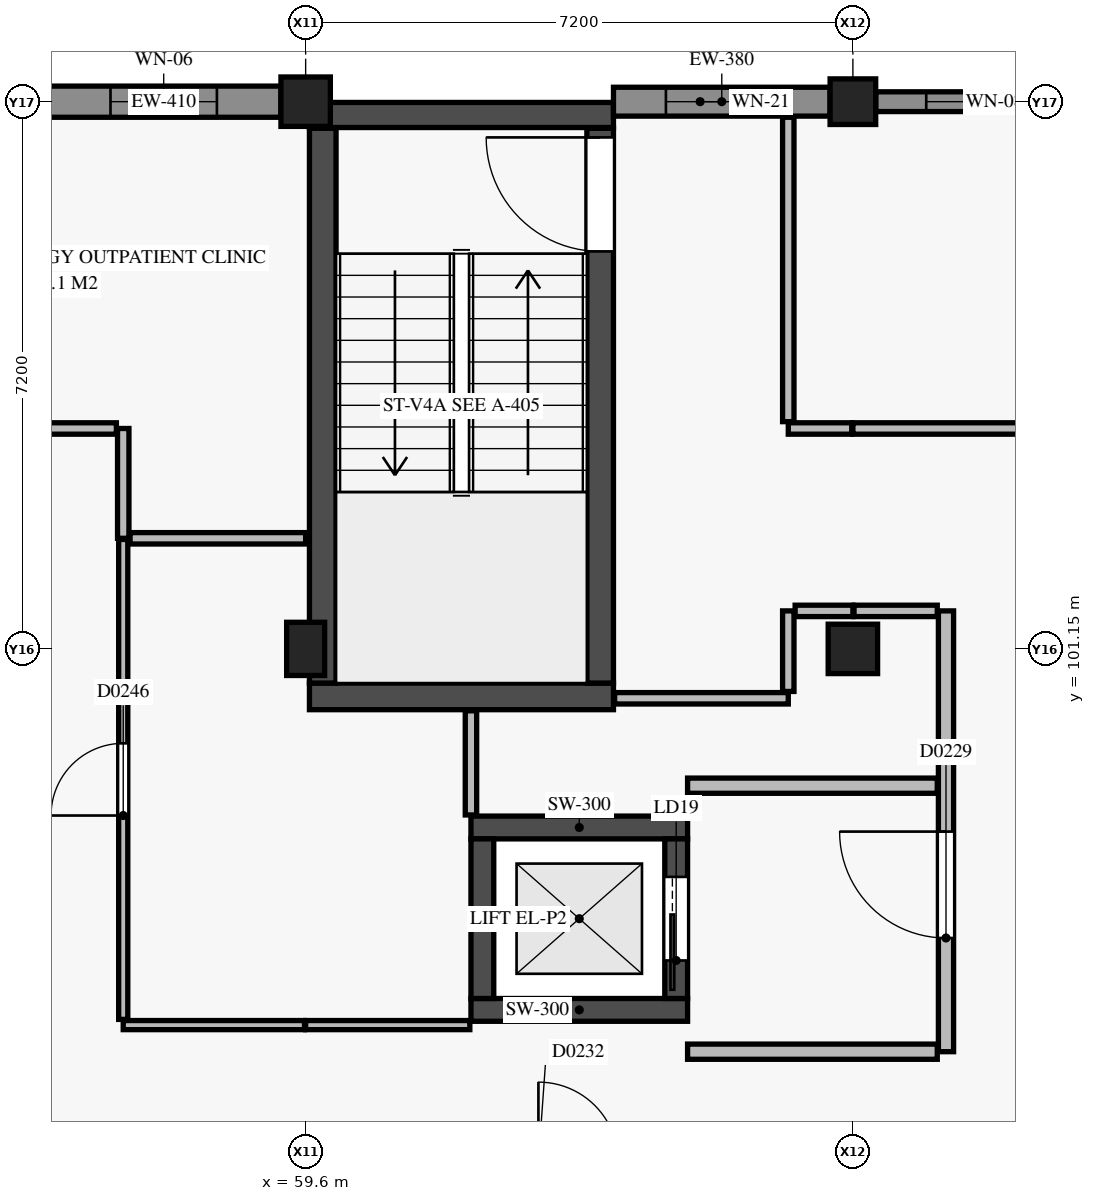
"""IFC4 building model, lengths in metres.
Left out: names, types, materials, properties, quantities, classifications, styles, units other than length and angle.
Written with IfcOpenShell. Run it as: python <this file> out.ifc"""

import sys

from ifc_helpers import new_model, si_unit, direction, frame, frame_2d, origin, origin_2d, place, context, subcontext, project, spatial, rectangle, circle, extrude, element, fill, save


model = new_model("IFC4")
c1 = context("Model", 3, precision=1e-05, world=origin(), true_north=direction((0.0, 1.0)))
c2 = subcontext(c1, "Body", "Model", "MODEL_VIEW")
j1 = project(units=[si_unit("LENGTHUNIT", "METRE"), si_unit("PLANEANGLEUNIT", "RADIAN")], contexts=[c1])
p1 = place(None, origin())
s1 = spatial("IfcSite", under=j1, at=p1, CompositionType="ELEMENT")
p2 = place(p1, origin())
s2 = spatial("IfcBuilding", under=s1, at=p2, CompositionType="ELEMENT")
p3 = place(p2, frame((0.0, 0.0, 9.0)))
s3 = spatial("IfcBuildingStorey", under=s2, at=p3, CompositionType="ELEMENT", Elevation=9.0)
p4 = place(p3, frame((59.6, 101.15, 0.0), z_axis=(0.0, 0.0, 1.0), x_axis=(1.0, 0.0, 0.0)))
e1 = element("IfcColumn", 1, at=p4, inside=s3, PredefinedType="COLUMN", context=c2, shape_type="SweptSolid", body=[
    extrude(rectangle(XDim=0.5, YDim=0.7, at=origin_2d()), origin(), (0.0, 0.0, 1.0), 4.2),
])
p5 = place(p3, frame((59.6, 108.35, 0.0), z_axis=(0.0, 0.0, 1.0), x_axis=(1.0, 0.0, 0.0)))
e2 = element("IfcColumn", 2, at=p5, inside=s3, PredefinedType="COLUMN", context=c2, shape_type="SweptSolid", body=[
    extrude(circle(Radius=0.325, at=origin_2d()), origin(), (0.0, 0.0, 1.0), 4.2),
])
p6 = place(p3, frame((66.8, 101.15, 0.0), z_axis=(0.0, 0.0, 1.0), x_axis=(1.0, 0.0, 0.0)))
e3 = element("IfcColumn", 3, at=p6, inside=s3, PredefinedType="COLUMN", context=c2, shape_type="SweptSolid", body=[
    extrude(rectangle(XDim=0.65, YDim=0.65, at=origin_2d()), origin(), (0.0, 0.0, 1.0), 4.2),
])
p7 = place(p3, frame((66.8, 108.35, 0.0), z_axis=(0.0, 0.0, 1.0), x_axis=(1.0, 0.0, 0.0)))
e4 = element("IfcColumn", 4, at=p7, inside=s3, PredefinedType="COLUMN", context=c2, shape_type="SweptSolid", body=[
    extrude(rectangle(XDim=0.6, YDim=0.6, at=origin_2d()), origin(), (0.0, 0.0, 1.0), 4.2),
])
p8 = place(p3, frame((59.65, 100.525, 0.0), z_axis=(0.0, 0.0, 1.0), x_axis=(1.0, 0.0, 0.0)))
e5 = element("IfcWall", 5, at=p8, inside=s3, PredefinedType="SHEAR", context=c2, shape_type="SweptSolid", body=[
    extrude(rectangle(XDim=4.0, YDim=0.35, at=frame_2d((2.0, 0.0))), origin(), (0.0, 0.0, 1.0), 3.95),
])
p9 = place(p3, frame((59.65, 108.175, 0.0), z_axis=(0.0, 0.0, 1.0), x_axis=(1.0, 0.0, 0.0)))
e6 = element("IfcWall", 6, at=p9, inside=s3, PredefinedType="SHEAR", context=c2, shape_type="SweptSolid", body=[
    extrude(rectangle(XDim=4.0, YDim=0.33, at=frame_2d((2.0, 0.0))), origin(), (0.0, 0.0, 1.0), 3.95),
])
p10 = place(p3, frame((59.825, 100.7, 0.0), z_axis=(0.0, 0.0, 1.0), x_axis=(0.0, 1.0, 0.0)))
e7 = element("IfcWall", 7, at=p10, inside=s3, PredefinedType="SHEAR", context=c2, shape_type="SweptSolid", body=[
    extrude(rectangle(XDim=7.3, YDim=0.35, at=frame_2d((3.65, 0.0))), origin(), (0.0, 0.0, 1.0), 3.95),
])
p11 = place(p3, frame((63.475, 100.7, 0.0), z_axis=(0.0, 0.0, 1.0), x_axis=(0.0, 1.0, 0.0)))
e8 = element("IfcWall", 8, at=p11, inside=s3, PredefinedType="SHEAR", context=c2, shape_type="SweptSolid", body=[
    extrude(rectangle(XDim=7.3, YDim=0.35, at=frame_2d((3.65, 0.0))), origin(), (0.0, 0.0, 1.0), 3.95),
])
p12 = place(p11, frame((5.68, 0.0, 0.0)))
e9 = element("IfcOpeningElement", 9, at=p12, cuts=e8, PredefinedType="OPENING", context=c2, shape_type="SweptSolid", body=[
    extrude(rectangle(XDim=1.5, YDim=2.15, at=frame_2d((0.75, 1.075))), frame((0.0, 0.185, 0.0), z_axis=(0.0, -1.0, 0.0), x_axis=(1.0, 0.0, 0.0)), (0.0, 0.0, 1.0), 0.37),
])
for number, where, z_axis, x_axis in (
    (10, (61.775, 96.4, 0.0), (0.0, 0.0, 1.0), (1.0, 0.0, 0.0)),
    (11, (61.775, 98.8, 0.0), (0.0, 0.0, 1.0), (1.0, 0.0, 0.0)),
):
    element("IfcWall", number, at=place(p3, frame(where, z_axis=z_axis, x_axis=x_axis)), inside=s3, PredefinedType="SHEAR", context=c2, shape_type="SweptSolid", body=[
        extrude(rectangle(XDim=2.85, YDim=0.3, at=frame_2d((1.425, 0.0))), origin(), (0.0, 0.0, 1.0), 3.95),
    ])
p13 = place(p3, frame((61.925, 96.55, 0.0), z_axis=(0.0, 0.0, 1.0), x_axis=(0.0, 1.0, 0.0)))
e12 = element("IfcWall", 12, at=p13, inside=s3, PredefinedType="SHEAR", context=c2, shape_type="SweptSolid", body=[
    extrude(rectangle(XDim=2.1, YDim=0.3, at=frame_2d((1.05, 0.0))), origin(), (0.0, 0.0, 1.0), 3.95),
])
p14 = place(p3, frame((64.475, 96.55, 0.0), z_axis=(0.0, 0.0, 1.0), x_axis=(0.0, 1.0, 0.0)))
e13 = element("IfcWall", 13, at=p14, inside=s3, PredefinedType="SHEAR", context=c2, shape_type="SweptSolid", body=[
    extrude(rectangle(XDim=2.1, YDim=0.3, at=frame_2d((1.05, 0.0))), origin(), (0.0, 0.0, 1.0), 3.95),
])
p15 = place(p14, frame((0.5, 0.0, 0.0)))
e14 = element("IfcOpeningElement", 14, at=p15, cuts=e13, PredefinedType="OPENING", context=c2, shape_type="SweptSolid", body=[
    extrude(rectangle(XDim=1.1, YDim=2.15, at=frame_2d((0.55, 1.075))), frame((0.0, 0.16, 0.0), z_axis=(0.0, -1.0, 0.0), x_axis=(1.0, 0.0, 0.0)), (0.0, 0.0, 1.0), 0.32),
])
p16 = place(p3, frame((56.19, 108.35, 0.0), z_axis=(0.0, 0.0, 1.0), x_axis=(1.0, 0.0, 0.0)))
e15 = element("IfcWall", 15, at=p16, inside=s3, PredefinedType="USERDEFINED", context=c2, shape_type="SweptSolid", body=[
    extrude(rectangle(XDim=3.085, YDim=0.41, at=frame_2d((1.542, 0.0))), origin(), (0.0, 0.0, 1.0), 3.13),
])
p17 = place(p16, frame((0.843, 0.0, 0.9)))
e16 = element("IfcOpeningElement", 16, at=p17, cuts=e15, PredefinedType="OPENING", context=c2, shape_type="SweptSolid", body=[
    extrude(rectangle(XDim=1.4, YDim=1.8, at=frame_2d((0.7, 0.9))), frame((0.0, 0.215, 0.0), z_axis=(0.0, -1.0, 0.0), x_axis=(1.0, 0.0, 0.0)), (0.0, 0.0, 1.0), 0.43),
])
p18 = place(p3, frame((63.65, 108.35, 0.0), z_axis=(0.0, 0.0, 1.0), x_axis=(1.0, 0.0, 0.0)))
e17 = element("IfcWall", 17, at=p18, inside=s3, PredefinedType="USERDEFINED", context=c2, shape_type="SweptSolid", body=[
    extrude(rectangle(XDim=2.85, YDim=0.38, at=frame_2d((1.425, 0.0))), origin(), (0.0, 0.0, 1.0), 3.13),
])
p19 = place(p18, frame((0.69, 0.0, 0.95)))
e18 = element("IfcOpeningElement", 18, at=p19, cuts=e17, PredefinedType="OPENING", context=c2, shape_type="SweptSolid", body=[
    extrude(rectangle(XDim=0.9, YDim=1.2, at=frame_2d((0.45, 0.6))), frame((0.0, 0.2, 0.0), z_axis=(0.0, -1.0, 0.0), x_axis=(1.0, 0.0, 0.0)), (0.0, 0.0, 1.0), 0.4),
])
p20 = place(p3, frame((67.1, 108.35, 0.0), z_axis=(0.0, 0.0, 1.0), x_axis=(1.0, 0.0, 0.0)))
e19 = element("IfcWall", 19, at=p20, inside=s3, PredefinedType="SOLIDWALL", context=c2, shape_type="SweptSolid", body=[
    extrude(rectangle(XDim=3.13, YDim=0.26, at=frame_2d((1.565, 0.0))), origin(), (0.0, 0.0, 1.0), 3.13),
])
p21 = place(p20, frame((0.665, 0.0, 0.9)))
e20 = element("IfcOpeningElement", 20, at=p21, cuts=e19, PredefinedType="OPENING", context=c2, shape_type="SweptSolid", body=[
    extrude(rectangle(XDim=1.8, YDim=1.8, at=frame_2d((0.9, 0.9))), frame((0.0, 0.14, 0.0), z_axis=(0.0, -1.0, 0.0), x_axis=(1.0, 0.0, 0.0)), (0.0, 0.0, 1.0), 0.28),
])
p22 = place(p3, frame((68.025, 95.85, 0.0), z_axis=(0.0, 0.0, 1.0), x_axis=(0.0, 1.0, 0.0)))
e21 = element("IfcWall", 21, at=p22, inside=s3, PredefinedType="PARTITIONING", context=c2, shape_type="SweptSolid", body=[
    extrude(rectangle(XDim=5.8, YDim=0.2, at=frame_2d((2.9, 0.0))), origin(), (0.0, 0.0, 1.0), 3.285),
])
p23 = place(p22, frame((1.496, 0.0, 0.0)))
e22 = element("IfcOpeningElement", 22, at=p23, cuts=e21, PredefinedType="OPENING", context=c2, shape_type="SweptSolid", body=[
    extrude(rectangle(XDim=1.4, YDim=2.2, at=frame_2d((0.7, 1.1))), frame((0.0, 0.11, 0.0), z_axis=(0.0, -1.0, 0.0), x_axis=(1.0, 0.0, 0.0)), (0.0, 0.0, 1.0), 0.22),
])
for number, where, z_axis, x_axis in (
    (23, (64.625, 95.85, 0.0), (0.0, 0.0, 1.0), (1.0, 0.0, 0.0)),
    (24, (64.625, 99.35, 0.0), (0.0, 0.0, 1.0), (1.0, 0.0, 0.0)),
):
    element("IfcWall", number, at=place(p3, frame(where, z_axis=z_axis, x_axis=x_axis)), inside=s3, PredefinedType="PARTITIONING", context=c2, shape_type="SweptSolid", body=[
        extrude(rectangle(XDim=3.285, YDim=0.2, at=frame_2d((1.643, 0.0))), origin(), (0.0, 0.0, 1.0), 3.285),
    ])
p24 = place(p3, frame((57.2, 102.605, 0.0), z_axis=(0.0, 0.0, 1.0), x_axis=(0.0, 1.0, 0.0)))
e25 = element("IfcWall", 25, at=p24, inside=s3, PredefinedType="PARTITIONING", context=c2, shape_type="SweptSolid", body=[
    extrude(rectangle(XDim=1.445, YDim=0.15, at=frame_2d((0.723, 0.0))), origin(), (0.0, 0.0, 1.0), 3.515),
])
p25 = place(p3, frame((55.85, 104.05, 0.0), z_axis=(0.0, 0.0, 1.0), x_axis=(1.0, 0.0, 0.0)))
e26 = element("IfcWall", 26, at=p25, inside=s3, PredefinedType="PARTITIONING", context=c2, shape_type="SweptSolid", body=[
    extrude(rectangle(XDim=1.26, YDim=0.15, at=frame_2d((0.63, 0.0))), origin(), (0.0, 0.0, 1.0), 3.95),
])
p26 = place(p3, frame((66.8, 104.05, 0.0), z_axis=(0.0, 0.0, 1.0), x_axis=(1.0, 0.0, 0.0)))
e27 = element("IfcWall", 27, at=p26, inside=s3, PredefinedType="PARTITIONING", context=c2, shape_type="SweptSolid", body=[
    extrude(rectangle(XDim=7.2, YDim=0.15, at=frame_2d((3.6, 0.0))), origin(), (0.0, 0.0, 1.0), 3.135),
])
p27 = place(p26, frame((3.1, 0.0, 0.0)))
e28 = element("IfcOpeningElement", 28, at=p27, cuts=e27, PredefinedType="OPENING", context=c2, shape_type="SweptSolid", body=[
    extrude(rectangle(XDim=1.0, YDim=2.15, at=frame_2d((0.5, 1.075))), frame((0.0, 0.085, 0.0), z_axis=(0.0, -1.0, 0.0), x_axis=(1.0, 0.0, 0.0)), (0.0, 0.0, 1.0), 0.17),
])
p28 = place(p3, frame((65.95, 104.05, 0.0), z_axis=(0.0, 0.0, 1.0), x_axis=(1.0, 0.0, 0.0)))
e29 = element("IfcWall", 29, at=p28, inside=s3, PredefinedType="PARTITIONING", context=c2, shape_type="SweptSolid", body=[
    extrude(rectangle(XDim=0.835, YDim=0.15, at=frame_2d((0.417, 0.0))), origin(), (0.0, 0.0, 1.0), 3.285),
])
p29 = place(p3, frame((65.95, 104.14, 0.0), z_axis=(0.0, 0.0, 1.0), x_axis=(0.0, 1.0, 0.0)))
e30 = element("IfcWall", 30, at=p29, inside=s3, PredefinedType="PARTITIONING", context=c2, shape_type="SweptSolid", body=[
    extrude(rectangle(XDim=4.005, YDim=0.15, at=frame_2d((2.002, 0.0))), origin(), (0.0, 0.0, 1.0), 3.95),
])
p30 = place(p3, frame((63.665, 100.5, 0.0), z_axis=(0.0, 0.0, 1.0), x_axis=(1.0, 0.0, 0.0)))
e31 = element("IfcWall", 31, at=p30, inside=s3, PredefinedType="PARTITIONING", context=c2, shape_type="SweptSolid", body=[
    extrude(rectangle(XDim=2.285, YDim=0.15, at=frame_2d((1.143, 0.0))), origin(), (0.0, 0.0, 1.0), 3.95),
])
p31 = place(p3, frame((65.95, 100.59, 0.0), z_axis=(0.0, 0.0, 1.0), x_axis=(0.0, 1.0, 0.0)))
e32 = element("IfcWall", 32, at=p31, inside=s3, PredefinedType="PARTITIONING", context=c2, shape_type="SweptSolid", body=[
    extrude(rectangle(XDim=1.06, YDim=0.15, at=frame_2d((0.53, 0.0))), origin(), (0.0, 0.0, 1.0), 3.95),
])
p32 = place(p3, frame((66.04, 101.65, 0.0), z_axis=(0.0, 0.0, 1.0), x_axis=(1.0, 0.0, 0.0)))
e33 = element("IfcWall", 33, at=p32, inside=s3, PredefinedType="PARTITIONING", context=c2, shape_type="SweptSolid", body=[
    extrude(rectangle(XDim=0.76, YDim=0.15, at=frame_2d((0.38, 0.0))), origin(), (0.0, 0.0, 1.0), 3.285),
])
p33 = place(p3, frame((66.815, 101.65, 0.0), z_axis=(0.0, 0.0, 1.0), x_axis=(1.0, 0.0, 0.0)))
e34 = element("IfcWall", 34, at=p33, inside=s3, PredefinedType="PARTITIONING", context=c2, shape_type="SweptSolid", body=[
    extrude(rectangle(XDim=1.095, YDim=0.15, at=frame_2d((0.547, 0.0))), origin(), (0.0, 0.0, 1.0), 3.285),
])
p34 = place(p3, frame((59.6, 96.2, 0.0), z_axis=(0.0, 0.0, 1.0), x_axis=(1.0, 0.0, 0.0)))
e35 = element("IfcWall", 35, at=p34, inside=s3, PredefinedType="PARTITIONING", context=c2, shape_type="SweptSolid", body=[
    extrude(rectangle(XDim=2.16, YDim=0.12, at=frame_2d((1.08, 0.0))), origin(), (0.0, 0.0, 1.0), 3.455),
])
p35 = place(p3, frame((57.2, 96.2, 0.0), z_axis=(0.0, 0.0, 1.0), x_axis=(1.0, 0.0, 0.0)))
e36 = element("IfcWall", 36, at=p35, inside=s3, PredefinedType="PARTITIONING", context=c2, shape_type="SweptSolid", body=[
    extrude(rectangle(XDim=2.385, YDim=0.12, at=frame_2d((1.192, 0.0))), origin(), (0.0, 0.0, 1.0), 3.455),
])
p36 = place(p3, frame((57.2, 96.275, 0.0), z_axis=(0.0, 0.0, 1.0), x_axis=(0.0, 1.0, 0.0)))
e37 = element("IfcWall", 37, at=p36, inside=s3, PredefinedType="PARTITIONING", context=c2, shape_type="SweptSolid", body=[
    extrude(rectangle(XDim=6.315, YDim=0.12, at=frame_2d((3.158, 0.0))), origin(), (0.0, 0.0, 1.0), 3.135),
])
p37 = place(p36, frame((2.683, 0.0, 0.0)))
e38 = element("IfcOpeningElement", 38, at=p37, cuts=e37, PredefinedType="OPENING", context=c2, shape_type="SweptSolid", body=[
    extrude(rectangle(XDim=0.95, YDim=2.1, at=frame_2d((0.475, 1.05))), frame((0.0, 0.07, 0.0), z_axis=(0.0, -1.0, 0.0), x_axis=(1.0, 0.0, 0.0)), (0.0, 0.0, 1.0), 0.14),
])
p38 = place(p3, frame((57.29, 102.605, 0.0), z_axis=(0.0, 0.0, 1.0), x_axis=(1.0, 0.0, 0.0)))
e39 = element("IfcWall", 39, at=p38, inside=s3, PredefinedType="PARTITIONING", context=c2, shape_type="SweptSolid", body=[
    extrude(rectangle(XDim=2.31, YDim=0.15, at=frame_2d((1.155, 0.0))), origin(), (0.0, 0.0, 1.0), 3.215),
])
p39 = place(p3, frame((61.775, 98.965, 0.0), z_axis=(0.0, 0.0, 1.0), x_axis=(0.0, 1.0, 0.0)))
e40 = element("IfcWall", 40, at=p39, inside=s3, PredefinedType="PARTITIONING", context=c2, shape_type="SweptSolid", body=[
    extrude(rectangle(XDim=1.37, YDim=0.15, at=frame_2d((0.685, 0.0))), origin(), (0.0, 0.0, 1.0), 3.95),
])
p40 = place(p17, origin())
e41 = element("IfcWindow", 41, at=p40, inside=s3, PartitioningType="SINGLE_PANEL", PredefinedType="WINDOW", context=c2, shape_type="SweptSolid", body=[
    extrude(rectangle(XDim=1.4, YDim=1.8, at=frame_2d((0.7, 0.9))), frame((0.0, 0.03, 0.0), z_axis=(0.0, -1.0, 0.0), x_axis=(1.0, 0.0, 0.0)), (0.0, 0.0, 1.0), 0.06),
])
fill(e16, e41)
p41 = place(p19, origin())
e42 = element("IfcWindow", 42, at=p41, inside=s3, PartitioningType="SINGLE_PANEL", PredefinedType="WINDOW", context=c2, shape_type="SweptSolid", body=[
    extrude(rectangle(XDim=0.9, YDim=1.2, at=frame_2d((0.45, 0.6))), frame((0.0, 0.03, 0.0), z_axis=(0.0, -1.0, 0.0), x_axis=(1.0, 0.0, 0.0)), (0.0, 0.0, 1.0), 0.06),
])
fill(e18, e42)
p42 = place(p21, origin())
e43 = element("IfcWindow", 43, at=p42, inside=s3, PartitioningType="SINGLE_PANEL", PredefinedType="WINDOW", context=c2, shape_type="SweptSolid", body=[
    extrude(rectangle(XDim=1.8, YDim=1.8, at=frame_2d((0.9, 0.9))), frame((0.0, 0.03, 0.0), z_axis=(0.0, -1.0, 0.0), x_axis=(1.0, 0.0, 0.0)), (0.0, 0.0, 1.0), 0.06),
])
fill(e20, e43)
p43 = place(p12, origin())
e44 = element("IfcDoor", 44, at=p43, inside=s3, OperationType="SINGLE_SWING_RIGHT", PredefinedType="DOOR", context=c2, shape_type="SweptSolid", body=[
    extrude(rectangle(XDim=1.5, YDim=2.15, at=frame_2d((0.75, 1.075))), frame((0.0, 0.025, 0.0), z_axis=(0.0, -1.0, 0.0), x_axis=(1.0, 0.0, 0.0)), (0.0, 0.0, 1.0), 0.05),
])
fill(e9, e44)
p44 = place(p15, origin())
e45 = element("IfcDoor", 45, at=p44, inside=s3, OperationType="SLIDING_TO_LEFT", PredefinedType="DOOR", context=c2, shape_type="SweptSolid", body=[
    extrude(rectangle(XDim=1.1, YDim=2.15, at=frame_2d((0.55, 1.075))), frame((0.0, 0.025, 0.0), z_axis=(0.0, -1.0, 0.0), x_axis=(1.0, 0.0, 0.0)), (0.0, 0.0, 1.0), 0.05),
])
fill(e14, e45)
p45 = place(p23, origin())
e46 = element("IfcDoor", 46, at=p45, inside=s3, OperationType="SINGLE_SWING_RIGHT", PredefinedType="DOOR", context=c2, shape_type="SweptSolid", body=[
    extrude(rectangle(XDim=1.4, YDim=2.2, at=frame_2d((0.7, 1.1))), frame((0.0, 0.025, 0.0), z_axis=(0.0, -1.0, 0.0), x_axis=(1.0, 0.0, 0.0)), (0.0, 0.0, 1.0), 0.05),
])
fill(e22, e46)
p46 = place(p37, origin())
e47 = element("IfcDoor", 47, at=p46, inside=s3, OperationType="SINGLE_SWING_LEFT", PredefinedType="DOOR", context=c2, shape_type="SweptSolid", body=[
    extrude(rectangle(XDim=0.95, YDim=2.1, at=frame_2d((0.475, 1.05))), frame((0.0, 0.025, 0.0), z_axis=(0.0, -1.0, 0.0), x_axis=(1.0, 0.0, 0.0)), (0.0, 0.0, 1.0), 0.05),
])
fill(e38, e47)
save(model, sys.argv[1])
